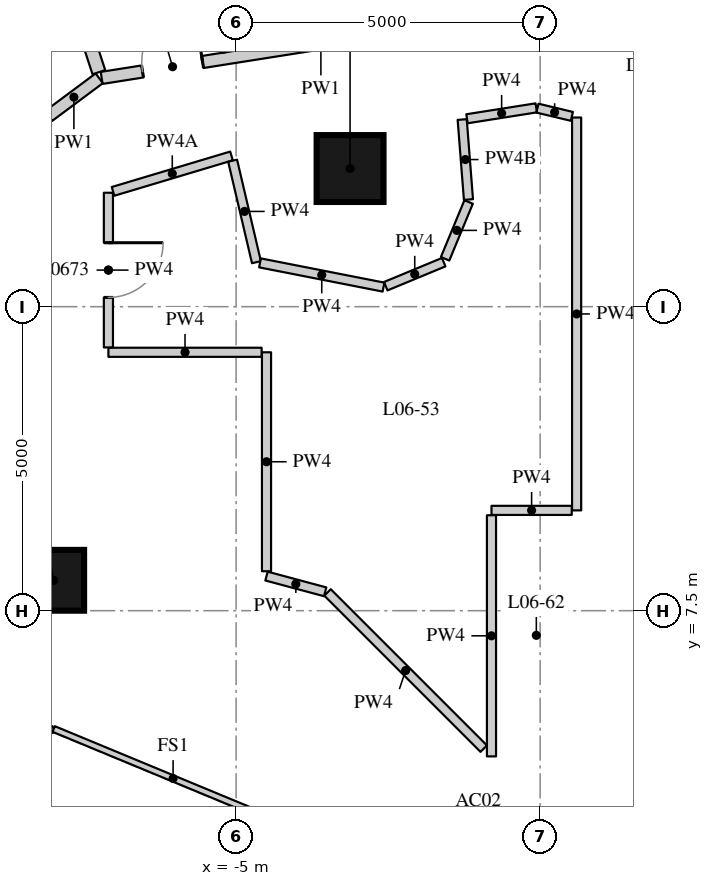
"""IFC4 building model, lengths in metres.
Left out: names, types, materials, properties, quantities, classifications, styles, units other than length and angle.
Written with IfcOpenShell. Run it as: python <this file> out.ifc"""

import sys

from ifc_helpers import new_model, si_unit, direction, frame, frame_2d, origin, origin_2d, place, context, subcontext, project, spatial, rectangle, extrude, element, fill, save


model = new_model("IFC4")
c1 = context("Model", 3, precision=1e-05, world=origin(), true_north=direction((0.0, 1.0)))
c2 = subcontext(c1, "Body", "Model", "MODEL_VIEW")
j1 = project(units=[si_unit("LENGTHUNIT", "METRE"), si_unit("PLANEANGLEUNIT", "RADIAN")], contexts=[c1])
p1 = place(None, origin())
s1 = spatial("IfcSite", under=j1, at=p1, CompositionType="ELEMENT")
p2 = place(p1, origin())
s2 = spatial("IfcBuilding", under=s1, at=p2, CompositionType="ELEMENT")
p3 = place(p2, frame((0.0, 0.0, 28.3)))
s3 = spatial("IfcBuildingStorey", under=s2, at=p3, CompositionType="ELEMENT", Elevation=28.3)
p4 = place(p3, frame((-8.0, 8.0, 0.0), z_axis=(0.0, 0.0, 1.0), x_axis=(1.0, 0.0, 0.0)))
e1 = element("IfcColumn", 1, at=p4, inside=s3, PredefinedType="COLUMN", context=c2, shape_type="SweptSolid", body=[
    extrude(rectangle(XDim=1.0, YDim=1.0, at=origin_2d()), origin(), (0.0, 0.0, 1.0), 3.3),
])
p5 = place(p3, frame((-3.126, 14.772, 0.0), z_axis=(0.0, 0.0, 1.0), x_axis=(1.0, 0.0, 0.0)))
e2 = element("IfcColumn", 2, at=p5, inside=s3, PredefinedType="COLUMN", context=c2, shape_type="SweptSolid", body=[
    extrude(rectangle(XDim=1.1, YDim=1.1, at=origin_2d()), origin(), (0.0, 0.0, 1.0), 3.3),
])
p6 = place(p3, frame((-8.084, 15.636, 0.0), z_axis=(0.0, 0.0, 1.0), x_axis=(0.802193962144, 0.597063520155, 0.0)))
e3 = element("IfcWall", 3, at=p6, inside=s3, PredefinedType="PARTITIONING", context=c2, shape_type="SweptSolid", body=[
    extrude(rectangle(XDim=1.039, YDim=0.2, at=frame_2d((0.52, 0.0))), origin(), (0.0, 0.0, 1.0), 3.02),
])
p7 = place(p3, frame((-7.211, 16.263, 0.0), z_axis=(0.0, 0.0, 1.0), x_axis=(0.987792503573, 0.155775382796, 0.0)))
e4 = element("IfcWall", 4, at=p7, inside=s3, PredefinedType="PARTITIONING", context=c2, shape_type="SweptSolid", body=[
    extrude(rectangle(XDim=7.3, YDim=0.2, at=frame_2d((3.65, 0.0))), origin(), (0.0, 0.0, 1.0), 3.02),
])
p8 = place(p7, frame((5.581, 0.0, 0.0)))
e5 = element("IfcOpeningElement", 5, at=p8, cuts=e4, PredefinedType="OPENING", context=c2, shape_type="SweptSolid", body=[
    extrude(rectangle(XDim=1.0, YDim=2.1, at=frame_2d((0.5, 1.05))), frame((0.0, 0.11, 0.0), z_axis=(0.0, -1.0, 0.0), x_axis=(1.0, 0.0, 0.0)), (0.0, 0.0, 1.0), 0.22),
])
p9 = place(p7, frame((0.68, 0.0, 0.0)))
e6 = element("IfcOpeningElement", 6, at=p9, cuts=e4, PredefinedType="OPENING", context=c2, shape_type="SweptSolid", body=[
    extrude(rectangle(XDim=1.0, YDim=2.1, at=frame_2d((0.5, 1.05))), frame((0.0, 0.11, 0.0), z_axis=(0.0, -1.0, 0.0), x_axis=(1.0, 0.0, 0.0)), (0.0, 0.0, 1.0), 0.22),
])
p10 = place(p3, frame((0.098, 17.377, 0.0), z_axis=(0.0, 0.0, 1.0), x_axis=(0.972602241469, -0.232475546864, 0.0)))
e7 = element("IfcWall", 7, at=p10, inside=s3, PredefinedType="PARTITIONING", context=c2, shape_type="SweptSolid", body=[
    extrude(rectangle(XDim=10.743, YDim=0.2, at=frame_2d((5.372, 0.0))), origin(), (0.0, 0.0, 1.0), 3.02),
])
p11 = place(p10, frame((4.242, 0.0, 0.0)))
e8 = element("IfcOpeningElement", 8, at=p11, cuts=e7, PredefinedType="OPENING", context=c2, shape_type="SweptSolid", body=[
    extrude(rectangle(XDim=1.0, YDim=2.1, at=frame_2d((0.5, 1.05))), frame((0.0, 0.11, 0.0), z_axis=(0.0, -1.0, 0.0), x_axis=(1.0, 0.0, 0.0)), (0.0, 0.0, 1.0), 0.22),
])
p12 = place(p10, frame((1.253, 0.0, 0.0)))
e9 = element("IfcOpeningElement", 9, at=p12, cuts=e7, PredefinedType="OPENING", context=c2, shape_type="SweptSolid", body=[
    extrude(rectangle(XDim=0.9, YDim=2.1, at=frame_2d((0.45, 1.05))), frame((0.0, 0.11, 0.0), z_axis=(0.0, -1.0, 0.0), x_axis=(1.0, 0.0, 0.0)), (0.0, 0.0, 1.0), 0.22),
])
p13 = place(p3, frame((0.6, 15.612, 0.0), z_axis=(0.0, 0.0, 1.0), x_axis=(0.0, -1.0, 0.0)))
e10 = element("IfcWall", 10, at=p13, inside=s3, PredefinedType="PARTITIONING", context=c2, shape_type="SweptSolid", body=[
    extrude(rectangle(XDim=6.462, YDim=0.15, at=frame_2d((3.231, 0.0))), origin(), (0.0, 0.0, 1.0), 2.47),
])
p14 = place(p3, frame((0.52, 9.15, 0.0), z_axis=(0.0, 0.0, 1.0), x_axis=(-1.0, 0.0, 0.0)))
e11 = element("IfcWall", 11, at=p14, inside=s3, PredefinedType="PARTITIONING", context=c2, shape_type="SweptSolid", body=[
    extrude(rectangle(XDim=1.32, YDim=0.15, at=frame_2d((0.66, 0.0))), origin(), (0.0, 0.0, 1.0), 3.02),
])
p15 = place(p3, frame((-0.8, 9.07, 0.0), z_axis=(0.0, 0.0, 1.0), x_axis=(0.0, -1.0, 0.0)))
e12 = element("IfcWall", 12, at=p15, inside=s3, PredefinedType="PARTITIONING", context=c2, shape_type="SweptSolid", body=[
    extrude(rectangle(XDim=3.966, YDim=0.15, at=frame_2d((1.983, 0.0))), origin(), (0.0, 0.0, 1.0), 3.02),
])
p16 = place(p3, frame((-0.927, 5.231, 0.0), z_axis=(0.0, 0.0, 1.0), x_axis=(-0.707106781187, 0.707106781187, 0.0)))
e13 = element("IfcWall", 13, at=p16, inside=s3, PredefinedType="PARTITIONING", context=c2, shape_type="SweptSolid", body=[
    extrude(rectangle(XDim=3.633, YDim=0.15, at=frame_2d((1.817, 0.0))), origin(), (0.0, 0.0, 1.0), 3.02),
])
p17 = place(p3, frame((-3.535, 7.811, 0.0), z_axis=(0.0, 0.0, 1.0), x_axis=(-0.965921867197, 0.258833820183, 0.0)))
e14 = element("IfcWall", 14, at=p17, inside=s3, PredefinedType="PARTITIONING", context=c2, shape_type="SweptSolid", body=[
    extrude(rectangle(XDim=0.999, YDim=0.15, at=frame_2d((0.5, 0.0))), origin(), (0.0, 0.0, 1.0), 3.02),
])
p18 = place(p3, frame((-4.5, 8.149, 0.0), z_axis=(0.0, 0.0, 1.0), x_axis=(0.0, 1.0, 0.0)))
e15 = element("IfcWall", 15, at=p18, inside=s3, PredefinedType="PARTITIONING", context=c2, shape_type="SweptSolid", body=[
    extrude(rectangle(XDim=3.601, YDim=0.15, at=frame_2d((1.8, 0.0))), origin(), (0.0, 0.0, 1.0), 3.02),
])
p19 = place(p3, frame((-4.58, 11.75, 0.0), z_axis=(0.0, 0.0, 1.0), x_axis=(-1.0, 0.0, 0.0)))
e16 = element("IfcWall", 16, at=p19, inside=s3, PredefinedType="PARTITIONING", context=c2, shape_type="SweptSolid", body=[
    extrude(rectangle(XDim=2.52, YDim=0.15, at=frame_2d((1.26, 0.0))), origin(), (0.0, 0.0, 1.0), 3.02),
])
p20 = place(p3, frame((-7.1, 11.83, 0.0), z_axis=(0.0, 0.0, 1.0), x_axis=(0.0, 1.0, 0.0)))
e17 = element("IfcWall", 17, at=p20, inside=s3, PredefinedType="PARTITIONING", context=c2, shape_type="SweptSolid", body=[
    extrude(rectangle(XDim=2.544, YDim=0.15, at=frame_2d((1.272, 0.0))), origin(), (0.0, 0.0, 1.0), 3.02),
])
p21 = place(p20, frame((0.822, 0.0, 0.0)))
e18 = element("IfcOpeningElement", 18, at=p21, cuts=e17, PredefinedType="OPENING", context=c2, shape_type="SweptSolid", body=[
    extrude(rectangle(XDim=0.9, YDim=2.1, at=frame_2d((0.45, 1.05))), frame((0.0, 0.085, 0.0), z_axis=(0.0, -1.0, 0.0), x_axis=(1.0, 0.0, 0.0)), (0.0, 0.0, 1.0), 0.17),
])
p22 = place(p3, frame((-7.024, 14.396, 0.0), z_axis=(0.0, 0.0, 1.0), x_axis=(0.958024310194, 0.286686974028, 0.0)))
e19 = element("IfcWall", 19, at=p22, inside=s3, PredefinedType="PARTITIONING", context=c2, shape_type="SweptSolid", body=[
    extrude(rectangle(XDim=2.034, YDim=0.15, at=frame_2d((1.017, 0.0))), origin(), (0.0, 0.0, 1.0), 2.57),
])
p23 = place(p3, frame((-5.057, 14.901, 0.0), z_axis=(0.0, 0.0, 1.0), x_axis=(0.228269361027, -0.973598017056, 0.0)))
e20 = element("IfcWall", 20, at=p23, inside=s3, PredefinedType="PARTITIONING", context=c2, shape_type="SweptSolid", body=[
    extrude(rectangle(XDim=1.714, YDim=0.15, at=frame_2d((0.857, 0.0))), origin(), (0.0, 0.0, 1.0), 3.02),
])
p24 = place(p3, frame((-4.607, 13.22, 0.0), z_axis=(0.0, 0.0, 1.0), x_axis=(0.981304142817, -0.192463449234, 0.0)))
e21 = element("IfcWall", 21, at=p24, inside=s3, PredefinedType="PARTITIONING", context=c2, shape_type="SweptSolid", body=[
    extrude(rectangle(XDim=2.07, YDim=0.15, at=frame_2d((1.035, 0.0))), origin(), (0.0, 0.0, 1.0), 3.02),
])
p25 = place(p3, frame((-2.539, 12.837, 0.0), z_axis=(0.0, 0.0, 1.0), x_axis=(0.923768662954, 0.382950985565, 0.0)))
e22 = element("IfcWall", 22, at=p25, inside=s3, PredefinedType="PARTITIONING", context=c2, shape_type="SweptSolid", body=[
    extrude(rectangle(XDim=1.031, YDim=0.15, at=frame_2d((0.516, 0.0))), origin(), (0.0, 0.0, 1.0), 3.02),
])
p26 = place(p3, frame((-1.563, 13.288, 0.0), z_axis=(0.0, 0.0, 1.0), x_axis=(0.38284922736, 0.923810840546, 0.0)))
e23 = element("IfcWall", 23, at=p26, inside=s3, PredefinedType="PARTITIONING", context=c2, shape_type="SweptSolid", body=[
    extrude(rectangle(XDim=1.011, YDim=0.15, at=frame_2d((0.506, 0.0))), origin(), (0.0, 0.0, 1.0), 3.02),
])
p27 = place(p3, frame((-1.179, 14.262, 0.0), z_axis=(0.0, 0.0, 1.0), x_axis=(-0.078054271799, 0.996949111366, 0.0)))
e24 = element("IfcWall", 24, at=p27, inside=s3, PredefinedType="PARTITIONING", context=c2, shape_type="SweptSolid", body=[
    extrude(rectangle(XDim=1.32, YDim=0.15, at=frame_2d((0.66, 0.0))), origin(), (0.0, 0.0, 1.0), 2.47),
])
p28 = place(p3, frame((-1.203, 15.591, 0.0), z_axis=(0.0, 0.0, 1.0), x_axis=(0.987814418255, 0.155636355288, 0.0)))
e25 = element("IfcWall", 25, at=p28, inside=s3, PredefinedType="PARTITIONING", context=c2, shape_type="SweptSolid", body=[
    extrude(rectangle(XDim=1.153, YDim=0.15, at=frame_2d((0.577, 0.0))), origin(), (0.0, 0.0, 1.0), 3.02),
])
p29 = place(p3, frame((-0.044, 15.766, 0.0), z_axis=(0.0, 0.0, 1.0), x_axis=(0.972535568527, -0.232754308121, 0.0)))
e26 = element("IfcWall", 26, at=p29, inside=s3, PredefinedType="PARTITIONING", context=c2, shape_type="SweptSolid", body=[
    extrude(rectangle(XDim=0.582, YDim=0.15, at=frame_2d((0.291, 0.0))), origin(), (0.0, 0.0, 1.0), 3.02),
])
p30 = place(p3, frame((-9.429, 23.014, 0.0), z_axis=(0.0, 0.0, 1.0), x_axis=(0.310239117306, -0.950658555998, 0.0)))
e27 = element("IfcWall", 27, at=p30, inside=s3, PredefinedType="PARTITIONING", context=c2, shape_type="SweptSolid", body=[
    extrude(rectangle(XDim=7.003, YDim=0.22, at=frame_2d((3.501, 0.0))), origin(), (0.0, 0.0, 1.0), 3.02),
])
p31 = place(p3, frame((-5.181, 16.684, 0.0), z_axis=(0.0, 0.0, 1.0), x_axis=(-0.156077517275, 0.987744809453, 0.0)))
e28 = element("IfcWall", 28, at=p31, inside=s3, PredefinedType="PARTITIONING", context=c2, shape_type="SweptSolid", body=[
    extrude(rectangle(XDim=2.399, YDim=0.12, at=frame_2d((1.2, 0.0))), origin(), (0.0, 0.0, 1.0), 3.02),
])
for number, where, z_axis, x_axis in (
    (29, (-11.927, 3.927, 0.0), (0.0, 0.0, 1.0), (0.924, 0.383, 0.0)),
    (30, (-8.0, 5.554, 0.0), (0.0, 0.0, 1.0), (0.924, -0.383, 0.0)),
):
    element("IfcWall", number, at=place(p3, frame(where, z_axis=z_axis, x_axis=x_axis)), inside=s3, PredefinedType="PARTITIONING", context=c2, shape_type="SweptSolid", body=[
        extrude(rectangle(XDim=4.251, YDim=0.1, at=frame_2d((2.125, 0.0))), origin(), (0.0, 0.0, 1.0), 3.02),
    ])
p32 = place(p9, origin())
e31 = element("IfcDoor", 31, at=p32, inside=s3, OperationType="SINGLE_SWING_RIGHT", PredefinedType="DOOR", context=c2, shape_type="SweptSolid", body=[
    extrude(rectangle(XDim=1.0, YDim=2.1, at=frame_2d((0.5, 1.05))), frame((0.0, 0.025, 0.0), z_axis=(0.0, -1.0, 0.0), x_axis=(1.0, 0.0, 0.0)), (0.0, 0.0, 1.0), 0.05),
])
fill(e6, e31)
p33 = place(p21, origin())
e32 = element("IfcDoor", 32, at=p33, inside=s3, OperationType="SINGLE_SWING_LEFT", PredefinedType="DOOR", context=c2, shape_type="SweptSolid", body=[
    extrude(rectangle(XDim=0.9, YDim=2.1, at=frame_2d((0.45, 1.05))), frame((0.0, 0.025, 0.0), z_axis=(0.0, -1.0, 0.0), x_axis=(1.0, 0.0, 0.0)), (0.0, 0.0, 1.0), 0.05),
])
fill(e18, e32)
save(model, sys.argv[1])
